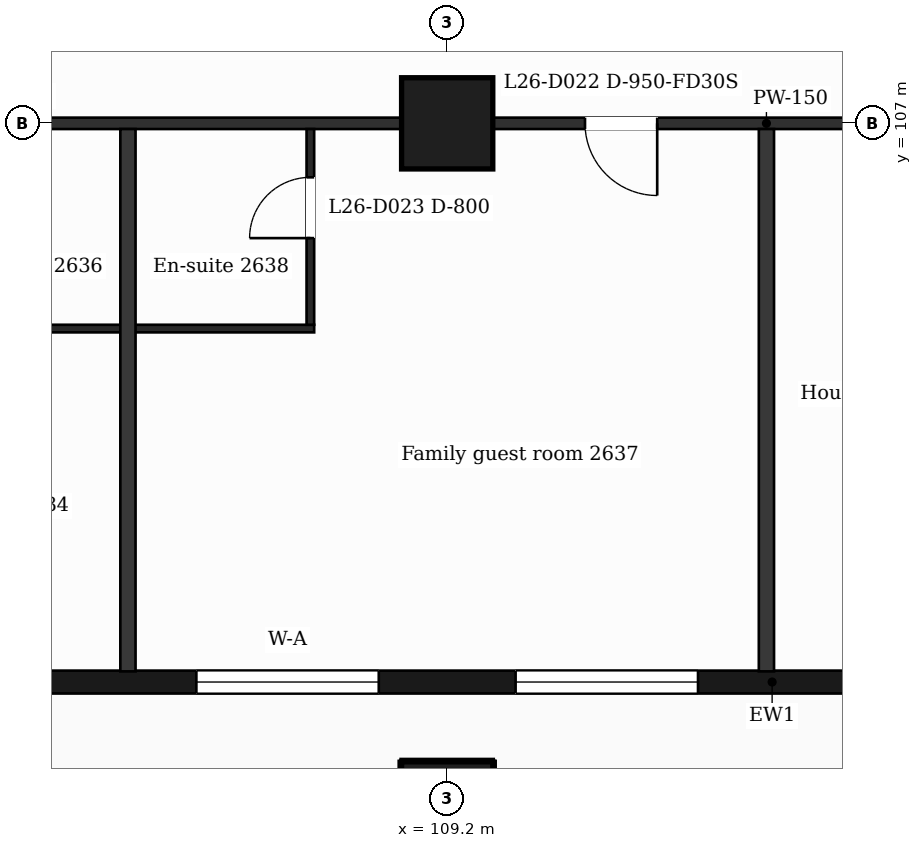
"""IFC4 building model, lengths in metres.
Left out: names, types, materials, properties, quantities, classifications, styles, units other than length and angle.
Written with IfcOpenShell. Run it as: python <this file> out.ifc"""

import sys

from ifc_helpers import new_model, si_unit, direction, frame, frame_2d, origin, origin_2d, place, context, subcontext, project, spatial, rectangle, extrude, element, fill, save


model = new_model("IFC4")
c1 = context("Model", 3, precision=1e-05, world=origin(), true_north=direction((0.0, 1.0)))
c2 = subcontext(c1, "Body", "Model", "MODEL_VIEW")
j1 = project(units=[si_unit("LENGTHUNIT", "METRE"), si_unit("PLANEANGLEUNIT", "RADIAN")], contexts=[c1])
p1 = place(None, origin())
s1 = spatial("IfcSite", under=j1, at=p1, CompositionType="ELEMENT")
p2 = place(p1, origin())
s2 = spatial("IfcBuilding", under=s1, at=p2, CompositionType="ELEMENT")
p3 = place(p2, frame((0.0, 0.0, 113.2)))
s3 = spatial("IfcBuildingStorey", under=s2, at=p3, CompositionType="ELEMENT", Elevation=113.2)
for number, where, z_axis, x_axis in (
    (1, (109.2, 98.0, 0.0), (0.0, 0.0, 1.0), (1.0, 0.0, 0.0)),
    (2, (109.2, 107.0, 0.0), (0.0, 0.0, 1.0), (1.0, 0.0, 0.0)),
):
    element("IfcColumn", number, at=place(p3, frame(where, z_axis=z_axis, x_axis=x_axis)), inside=s3, PredefinedType="COLUMN", context=c2, shape_type="SweptSolid", body=[
        extrude(rectangle(XDim=1.2, YDim=1.2, at=origin_2d()), origin(), (0.0, 0.0, 1.0), 3.7),
    ])
p4 = place(p3, frame((89.85, 99.65, 0.0), z_axis=(0.0, 0.0, 1.0), x_axis=(1.0, 0.0, 0.0)))
e3 = element("IfcWall", 3, at=p4, inside=s3, PredefinedType="SOLIDWALL", context=c2, shape_type="SweptSolid", body=[
    extrude(rectangle(XDim=47.25, YDim=0.3, at=frame_2d((23.625, 0.0))), origin(), (0.0, 0.0, 1.0), 3.38),
])
p5 = place(p4, frame((0.725, 0.0, 0.9)))
e4 = element("IfcOpeningElement", 4, at=p5, cuts=e3, PredefinedType="OPENING", context=c2, shape_type="SweptSolid", body=[
    extrude(rectangle(XDim=1.2, YDim=2.1, at=frame_2d((0.6, 1.05))), frame((0.0, 0.16, 0.0), z_axis=(0.0, -1.0, 0.0), x_axis=(1.0, 0.0, 0.0)), (0.0, 0.0, 1.0), 0.32),
])
p6 = place(p4, frame((3.45, 0.0, 0.9)))
e5 = element("IfcOpeningElement", 5, at=p6, cuts=e3, PredefinedType="OPENING", context=c2, shape_type="SweptSolid", body=[
    extrude(rectangle(XDim=2.4, YDim=2.1, at=frame_2d((1.2, 1.05))), frame((0.0, 0.16, 0.0), z_axis=(0.0, -1.0, 0.0), x_axis=(1.0, 0.0, 0.0)), (0.0, 0.0, 1.0), 0.32),
])
p7 = place(p4, frame((8.25, 0.0, 0.9)))
e6 = element("IfcOpeningElement", 6, at=p7, cuts=e3, PredefinedType="OPENING", context=c2, shape_type="SweptSolid", body=[
    extrude(rectangle(XDim=1.2, YDim=2.1, at=frame_2d((0.6, 1.05))), frame((0.0, 0.16, 0.0), z_axis=(0.0, -1.0, 0.0), x_axis=(1.0, 0.0, 0.0)), (0.0, 0.0, 1.0), 0.32),
])
p8 = place(p4, frame((12.45, 0.0, 0.9)))
e7 = element("IfcOpeningElement", 7, at=p8, cuts=e3, PredefinedType="OPENING", context=c2, shape_type="SweptSolid", body=[
    extrude(rectangle(XDim=1.2, YDim=2.1, at=frame_2d((0.6, 1.05))), frame((0.0, 0.16, 0.0), z_axis=(0.0, -1.0, 0.0), x_axis=(1.0, 0.0, 0.0)), (0.0, 0.0, 1.0), 0.32),
])
p9 = place(p4, frame((16.05, 0.0, 0.9)))
e8 = element("IfcOpeningElement", 8, at=p9, cuts=e3, PredefinedType="OPENING", context=c2, shape_type="SweptSolid", body=[
    extrude(rectangle(XDim=2.4, YDim=2.1, at=frame_2d((1.2, 1.05))), frame((0.0, 0.16, 0.0), z_axis=(0.0, -1.0, 0.0), x_axis=(1.0, 0.0, 0.0)), (0.0, 0.0, 1.0), 0.32),
])
p10 = place(p4, frame((20.25, 0.0, 0.9)))
e9 = element("IfcOpeningElement", 9, at=p10, cuts=e3, PredefinedType="OPENING", context=c2, shape_type="SweptSolid", body=[
    extrude(rectangle(XDim=2.4, YDim=2.1, at=frame_2d((1.2, 1.05))), frame((0.0, 0.16, 0.0), z_axis=(0.0, -1.0, 0.0), x_axis=(1.0, 0.0, 0.0)), (0.0, 0.0, 1.0), 0.32),
])
p11 = place(p4, frame((25.05, 0.0, 0.0)))
e10 = element("IfcOpeningElement", 10, at=p11, cuts=e3, PredefinedType="OPENING", context=c2, shape_type="SweptSolid", body=[
    extrude(rectangle(XDim=1.2, YDim=2.4, at=frame_2d((0.6, 1.2))), frame((0.0, 0.16, 0.0), z_axis=(0.0, -1.0, 0.0), x_axis=(1.0, 0.0, 0.0)), (0.0, 0.0, 1.0), 0.32),
])
p12 = place(p4, frame((28.65, 0.0, 0.9)))
e11 = element("IfcOpeningElement", 11, at=p12, cuts=e3, PredefinedType="OPENING", context=c2, shape_type="SweptSolid", body=[
    extrude(rectangle(XDim=2.4, YDim=2.1, at=frame_2d((1.2, 1.05))), frame((0.0, 0.16, 0.0), z_axis=(0.0, -1.0, 0.0), x_axis=(1.0, 0.0, 0.0)), (0.0, 0.0, 1.0), 0.32),
])
p13 = place(p4, frame((32.85, 0.0, 0.9)))
e12 = element("IfcOpeningElement", 12, at=p13, cuts=e3, PredefinedType="OPENING", context=c2, shape_type="SweptSolid", body=[
    extrude(rectangle(XDim=2.4, YDim=2.1, at=frame_2d((1.2, 1.05))), frame((0.0, 0.16, 0.0), z_axis=(0.0, -1.0, 0.0), x_axis=(1.0, 0.0, 0.0)), (0.0, 0.0, 1.0), 0.32),
])
p14 = place(p4, frame((37.65, 0.0, 0.9)))
e13 = element("IfcOpeningElement", 13, at=p14, cuts=e3, PredefinedType="OPENING", context=c2, shape_type="SweptSolid", body=[
    extrude(rectangle(XDim=1.2, YDim=2.1, at=frame_2d((0.6, 1.05))), frame((0.0, 0.16, 0.0), z_axis=(0.0, -1.0, 0.0), x_axis=(1.0, 0.0, 0.0)), (0.0, 0.0, 1.0), 0.32),
])
p15 = place(p4, frame((41.85, 0.0, 0.9)))
e14 = element("IfcOpeningElement", 14, at=p15, cuts=e3, PredefinedType="OPENING", context=c2, shape_type="SweptSolid", body=[
    extrude(rectangle(XDim=1.2, YDim=2.1, at=frame_2d((0.6, 1.05))), frame((0.0, 0.16, 0.0), z_axis=(0.0, -1.0, 0.0), x_axis=(1.0, 0.0, 0.0)), (0.0, 0.0, 1.0), 0.32),
])
p16 = place(p4, frame((45.25, 0.0, 0.9)))
e15 = element("IfcOpeningElement", 15, at=p16, cuts=e3, PredefinedType="OPENING", context=c2, shape_type="SweptSolid", body=[
    extrude(rectangle(XDim=1.2, YDim=2.1, at=frame_2d((0.6, 1.05))), frame((0.0, 0.16, 0.0), z_axis=(0.0, -1.0, 0.0), x_axis=(1.0, 0.0, 0.0)), (0.0, 0.0, 1.0), 0.32),
])
p17 = place(p3, frame((102.55, 104.3, 0.0), z_axis=(0.0, 0.0, 1.0), x_axis=(1.0, 0.0, 0.0)))
e16 = element("IfcWall", 16, at=p17, inside=s3, PredefinedType="PARTITIONING", context=c2, shape_type="SweptSolid", body=[
    extrude(rectangle(XDim=4.9, YDim=0.1, at=frame_2d((2.45, 0.0))), origin(), (0.0, 0.0, 1.0), 3.38),
])
p18 = place(p3, frame((87.018, 107.0, 0.0), z_axis=(0.0, 0.0, 1.0), x_axis=(1.0, 0.0, 0.0)))
e17 = element("IfcWall", 17, at=p18, inside=s3, PredefinedType="PARTITIONING", context=c2, shape_type="SweptSolid", body=[
    extrude(rectangle(XDim=52.765, YDim=0.15, at=frame_2d((26.382, 0.0))), origin(), (0.0, 0.0, 1.0), 3.38),
])
p19 = place(p18, frame((1.032, 0.0, 0.0)))
e18 = element("IfcOpeningElement", 18, at=p19, cuts=e17, PredefinedType="OPENING", context=c2, shape_type="SweptSolid", body=[
    extrude(rectangle(XDim=0.95, YDim=2.1, at=frame_2d((0.475, 1.05))), frame((0.0, 0.085, 0.0), z_axis=(0.0, -1.0, 0.0), x_axis=(1.0, 0.0, 0.0)), (0.0, 0.0, 1.0), 0.17),
])
p20 = place(p18, frame((9.752, 0.0, 0.0)))
e19 = element("IfcOpeningElement", 19, at=p20, cuts=e17, PredefinedType="OPENING", context=c2, shape_type="SweptSolid", body=[
    extrude(rectangle(XDim=1.0, YDim=2.1, at=frame_2d((0.5, 1.05))), frame((0.0, 0.085, 0.0), z_axis=(0.0, -1.0, 0.0), x_axis=(1.0, 0.0, 0.0)), (0.0, 0.0, 1.0), 0.17),
])
p21 = place(p18, frame((23.995, 0.0, 0.0)))
e20 = element("IfcOpeningElement", 20, at=p21, cuts=e17, PredefinedType="OPENING", context=c2, shape_type="SweptSolid", body=[
    extrude(rectangle(XDim=0.95, YDim=2.1, at=frame_2d((0.475, 1.05))), frame((0.0, 0.085, 0.0), z_axis=(0.0, -1.0, 0.0), x_axis=(1.0, 0.0, 0.0)), (0.0, 0.0, 1.0), 0.17),
])
p22 = place(p18, frame((28.645, 0.0, 0.0)))
e21 = element("IfcOpeningElement", 21, at=p22, cuts=e17, PredefinedType="OPENING", context=c2, shape_type="SweptSolid", body=[
    extrude(rectangle(XDim=0.95, YDim=2.1, at=frame_2d((0.475, 1.05))), frame((0.0, 0.085, 0.0), z_axis=(0.0, -1.0, 0.0), x_axis=(1.0, 0.0, 0.0)), (0.0, 0.0, 1.0), 0.17),
])
p23 = place(p18, frame((36.632, 0.0, 0.0)))
e22 = element("IfcOpeningElement", 22, at=p23, cuts=e17, PredefinedType="OPENING", context=c2, shape_type="SweptSolid", body=[
    extrude(rectangle(XDim=1.0, YDim=2.1, at=frame_2d((0.5, 1.05))), frame((0.0, 0.085, 0.0), z_axis=(0.0, -1.0, 0.0), x_axis=(1.0, 0.0, 0.0)), (0.0, 0.0, 1.0), 0.17),
])
p24 = place(p18, frame((41.957, 0.0, 0.0)))
e23 = element("IfcOpeningElement", 23, at=p24, cuts=e17, PredefinedType="OPENING", context=c2, shape_type="SweptSolid", body=[
    extrude(rectangle(XDim=0.95, YDim=2.1, at=frame_2d((0.475, 1.05))), frame((0.0, 0.085, 0.0), z_axis=(0.0, -1.0, 0.0), x_axis=(1.0, 0.0, 0.0)), (0.0, 0.0, 1.0), 0.17),
])
p25 = place(p18, frame((45.607, 0.0, 0.0)))
e24 = element("IfcOpeningElement", 24, at=p25, cuts=e17, PredefinedType="OPENING", context=c2, shape_type="SweptSolid", body=[
    extrude(rectangle(XDim=0.95, YDim=2.1, at=frame_2d((0.475, 1.05))), frame((0.0, 0.085, 0.0), z_axis=(0.0, -1.0, 0.0), x_axis=(1.0, 0.0, 0.0)), (0.0, 0.0, 1.0), 0.17),
])
p26 = place(p18, frame((48.767, 0.0, 0.0)))
e25 = element("IfcOpeningElement", 25, at=p26, cuts=e17, PredefinedType="OPENING", context=c2, shape_type="SweptSolid", body=[
    extrude(rectangle(XDim=0.95, YDim=2.1, at=frame_2d((0.475, 1.05))), frame((0.0, 0.085, 0.0), z_axis=(0.0, -1.0, 0.0), x_axis=(1.0, 0.0, 0.0)), (0.0, 0.0, 1.0), 0.17),
])
p27 = place(p3, frame((105.0, 99.79, 0.0), z_axis=(0.0, 0.0, 1.0), x_axis=(0.0, 1.0, 0.0)))
e26 = element("IfcWall", 26, at=p27, inside=s3, PredefinedType="PARTITIONING", context=c2, shape_type="SweptSolid", body=[
    extrude(rectangle(XDim=7.135, YDim=0.2, at=frame_2d((3.567, 0.0))), origin(), (0.0, 0.0, 1.0), 3.38),
])
p28 = place(p3, frame((107.4, 104.35, 0.0), z_axis=(0.0, 0.0, 1.0), x_axis=(0.0, 1.0, 0.0)))
e27 = element("IfcWall", 27, at=p28, inside=s3, PredefinedType="PARTITIONING", context=c2, shape_type="SweptSolid", body=[
    extrude(rectangle(XDim=2.575, YDim=0.1, at=frame_2d((1.288, 0.0))), origin(), (0.0, 0.0, 1.0), 3.38),
])
p29 = place(p28, frame((1.14, 0.0, 0.0)))
e28 = element("IfcOpeningElement", 28, at=p29, cuts=e27, PredefinedType="OPENING", context=c2, shape_type="SweptSolid", body=[
    extrude(rectangle(XDim=0.8, YDim=2.1, at=frame_2d((0.4, 1.05))), frame((0.0, 0.06, 0.0), z_axis=(0.0, -1.0, 0.0), x_axis=(1.0, 0.0, 0.0)), (0.0, 0.0, 1.0), 0.12),
])
p30 = place(p3, frame((113.4, 99.79, 0.0), z_axis=(0.0, 0.0, 1.0), x_axis=(0.0, 1.0, 0.0)))
e29 = element("IfcWall", 29, at=p30, inside=s3, PredefinedType="PARTITIONING", context=c2, shape_type="SweptSolid", body=[
    extrude(rectangle(XDim=7.135, YDim=0.2, at=frame_2d((3.567, 0.0))), origin(), (0.0, 0.0, 1.0), 3.38),
])
p31 = place(p9, origin())
e30 = element("IfcWindow", 30, at=p31, inside=s3, PartitioningType="SINGLE_PANEL", PredefinedType="WINDOW", context=c2, shape_type="SweptSolid", body=[
    extrude(rectangle(XDim=2.4, YDim=2.1, at=frame_2d((1.2, 1.05))), frame((0.0, 0.03, 0.0), z_axis=(0.0, -1.0, 0.0), x_axis=(1.0, 0.0, 0.0)), (0.0, 0.0, 1.0), 0.06),
])
fill(e8, e30)
p32 = place(p10, origin())
e31 = element("IfcWindow", 31, at=p32, inside=s3, PartitioningType="SINGLE_PANEL", PredefinedType="WINDOW", context=c2, shape_type="SweptSolid", body=[
    extrude(rectangle(XDim=2.4, YDim=2.1, at=frame_2d((1.2, 1.05))), frame((0.0, 0.03, 0.0), z_axis=(0.0, -1.0, 0.0), x_axis=(1.0, 0.0, 0.0)), (0.0, 0.0, 1.0), 0.06),
])
fill(e9, e31)
p33 = place(p21, origin())
e32 = element("IfcDoor", 32, at=p33, inside=s3, OperationType="SINGLE_SWING_RIGHT", PredefinedType="DOOR", context=c2, shape_type="SweptSolid", body=[
    extrude(rectangle(XDim=0.95, YDim=2.1, at=frame_2d((0.475, 1.05))), frame((0.0, 0.025, 0.0), z_axis=(0.0, -1.0, 0.0), x_axis=(1.0, 0.0, 0.0)), (0.0, 0.0, 1.0), 0.05),
])
fill(e20, e32)
p34 = place(p29, origin())
e33 = element("IfcDoor", 33, at=p34, inside=s3, OperationType="SINGLE_SWING_LEFT", PredefinedType="DOOR", context=c2, shape_type="SweptSolid", body=[
    extrude(rectangle(XDim=0.8, YDim=2.1, at=frame_2d((0.4, 1.05))), frame((0.0, 0.025, 0.0), z_axis=(0.0, -1.0, 0.0), x_axis=(1.0, 0.0, 0.0)), (0.0, 0.0, 1.0), 0.05),
])
fill(e28, e33)
save(model, sys.argv[1])
